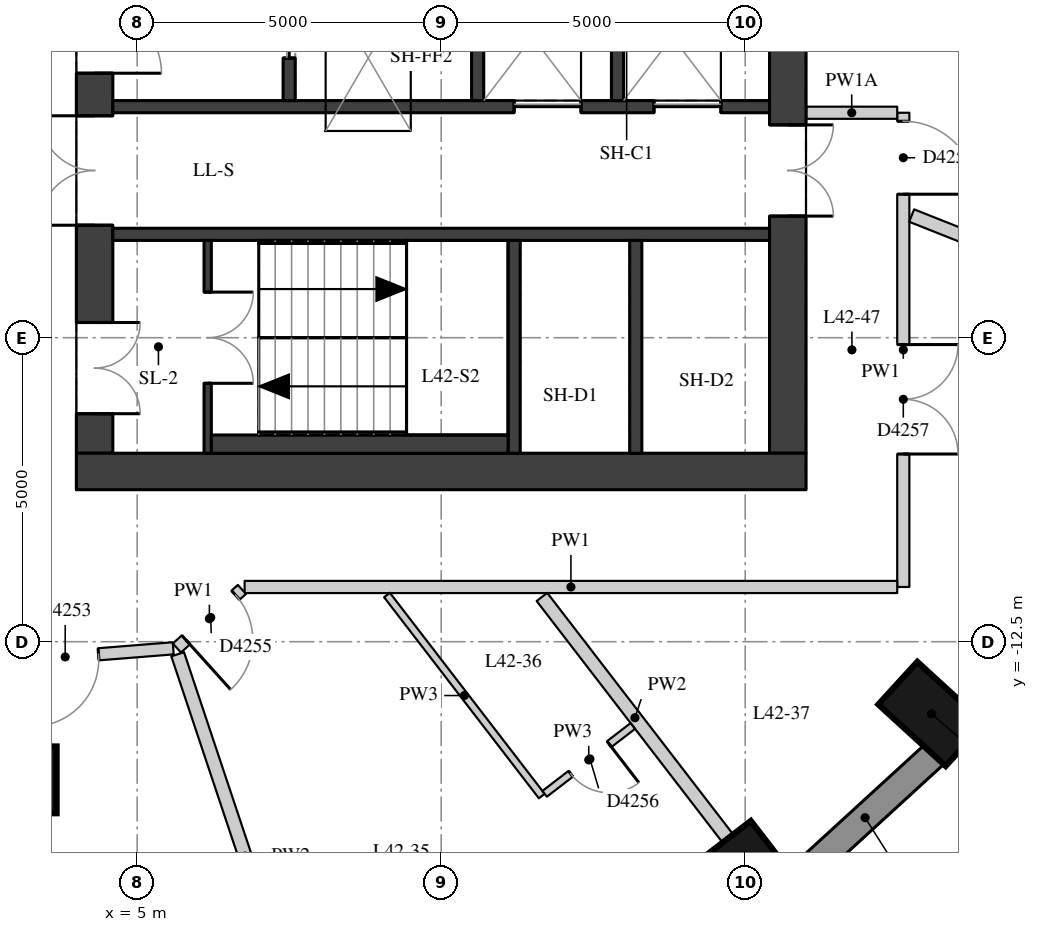
"""IFC4 building model, lengths in metres.
Left out: names, types, materials, properties, quantities, classifications, styles, units other than length and angle.
Written with IfcOpenShell. Run it as: python <this file> out.ifc"""

import sys

from ifc_helpers import new_model, si_unit, direction, frame, frame_2d, origin, origin_2d, place, context, subcontext, project, spatial, rectangle, extrude, element, fill, save


model = new_model("IFC4")
c1 = context("Model", 3, precision=1e-05, world=origin(), true_north=direction((0.0, 1.0)))
c2 = subcontext(c1, "Body", "Model", "MODEL_VIEW")
j1 = project(units=[si_unit("LENGTHUNIT", "METRE"), si_unit("PLANEANGLEUNIT", "RADIAN")], contexts=[c1])
p1 = place(None, origin())
s1 = spatial("IfcSite", under=j1, at=p1, CompositionType="ELEMENT")
p2 = place(p1, origin())
s2 = spatial("IfcBuilding", under=s1, at=p2, CompositionType="ELEMENT")
p3 = place(p2, frame((0.0, 0.0, 151.7)))
s3 = spatial("IfcBuildingStorey", under=s2, at=p3, CompositionType="ELEMENT", Elevation=151.7)
for number, where, z_axis, x_axis in (
    (1, (15.173, -16.332, 0.0), (0.0, 0.0, 1.0), (0.61, -0.792, 0.0)),
    (2, (18.064, -13.688, 0.0), (0.0, 0.0, 1.0), (0.738, -0.675, 0.0)),
):
    element("IfcColumn", number, at=place(p3, frame(where, z_axis=z_axis, x_axis=x_axis)), inside=s3, PredefinedType="COLUMN", context=c2, shape_type="SweptSolid", body=[
        extrude(rectangle(XDim=1.5, YDim=0.95, at=origin_2d()), origin(), (0.0, 0.0, 1.0), 3.3),
    ])
p4 = place(p3, frame((3.126, -14.772, 0.0), z_axis=(0.0, 0.0, 1.0), x_axis=(1.0, 0.0, 0.0)))
e3 = element("IfcColumn", 3, at=p4, inside=s3, PredefinedType="COLUMN", context=c2, shape_type="SweptSolid", body=[
    extrude(rectangle(XDim=1.1, YDim=1.1, at=origin_2d()), origin(), (0.0, 0.0, 1.0), 3.3),
])
p5 = place(p3, frame((15.83, -16.439, 0.0), z_axis=(0.0, 0.0, 1.0), x_axis=(0.737808755941, 0.675009807082, 0.0)))
e4 = element("IfcWall", 4, at=p5, inside=s3, PredefinedType="SOLIDWALL", context=c2, shape_type="SweptSolid", body=[
    extrude(rectangle(XDim=3.094, YDim=0.45, at=frame_2d((1.547, 0.0))), origin(), (0.0, 0.0, 1.0), 3.02),
])
p6 = place(p3, frame((4.3, -9.4, 0.0), z_axis=(0.0, 0.0, 1.0), x_axis=(0.0, 1.0, 0.0)))
e5 = element("IfcWall", 5, at=p6, inside=s3, PredefinedType="SHEAR", context=c2, shape_type="SweptSolid", body=[
    extrude(rectangle(XDim=18.8, YDim=0.6, at=frame_2d((9.4, 0.0))), origin(), (0.0, 0.0, 1.0), 3.02),
])
p7 = place(p6, frame((0.65, 0.0, 0.0)))
e6 = element("IfcOpeningElement", 6, at=p7, cuts=e5, PredefinedType="OPENING", context=c2, shape_type="SweptSolid", body=[
    extrude(rectangle(XDim=1.5, YDim=2.1, at=frame_2d((0.75, 1.05))), frame((0.0, 0.31, 0.0), z_axis=(0.0, -1.0, 0.0), x_axis=(1.0, 0.0, 0.0)), (0.0, 0.0, 1.0), 0.62),
])
p8 = place(p6, frame((3.75, 0.0, 0.0)))
e7 = element("IfcOpeningElement", 7, at=p8, cuts=e5, PredefinedType="OPENING", context=c2, shape_type="SweptSolid", body=[
    extrude(rectangle(XDim=1.8, YDim=2.1, at=frame_2d((0.9, 1.05))), frame((0.0, 0.31, 0.0), z_axis=(0.0, -1.0, 0.0), x_axis=(1.0, 0.0, 0.0)), (0.0, 0.0, 1.0), 0.62),
])
p9 = place(p6, frame((6.25, 0.0, 0.0)))
e8 = element("IfcOpeningElement", 8, at=p9, cuts=e5, PredefinedType="OPENING", context=c2, shape_type="SweptSolid", body=[
    extrude(rectangle(XDim=1.1, YDim=2.1, at=frame_2d((0.55, 1.05))), frame((0.0, 0.31, 0.0), z_axis=(0.0, -1.0, 0.0), x_axis=(1.0, 0.0, 0.0)), (0.0, 0.0, 1.0), 0.62),
])
p10 = place(p6, frame((8.9, 0.0, 0.0)))
e9 = element("IfcOpeningElement", 9, at=p10, cuts=e5, PredefinedType="OPENING", context=c2, shape_type="SweptSolid", body=[
    extrude(rectangle(XDim=1.0, YDim=2.1, at=frame_2d((0.5, 1.05))), frame((0.0, 0.31, 0.0), z_axis=(0.0, -1.0, 0.0), x_axis=(1.0, 0.0, 0.0)), (0.0, 0.0, 1.0), 0.62),
])
p11 = place(p6, frame((11.45, 0.0, 0.0)))
e10 = element("IfcOpeningElement", 10, at=p11, cuts=e5, PredefinedType="OPENING", context=c2, shape_type="SweptSolid", body=[
    extrude(rectangle(XDim=1.1, YDim=2.1, at=frame_2d((0.55, 1.05))), frame((0.0, 0.31, 0.0), z_axis=(0.0, -1.0, 0.0), x_axis=(1.0, 0.0, 0.0)), (0.0, 0.0, 1.0), 0.62),
])
p12 = place(p6, frame((13.25, 0.0, 0.0)))
e11 = element("IfcOpeningElement", 11, at=p12, cuts=e5, PredefinedType="OPENING", context=c2, shape_type="SweptSolid", body=[
    extrude(rectangle(XDim=1.8, YDim=2.1, at=frame_2d((0.9, 1.05))), frame((0.0, 0.31, 0.0), z_axis=(0.0, -1.0, 0.0), x_axis=(1.0, 0.0, 0.0)), (0.0, 0.0, 1.0), 0.62),
])
p13 = place(p6, frame((16.65, 0.0, 0.0)))
e12 = element("IfcOpeningElement", 12, at=p13, cuts=e5, PredefinedType="OPENING", context=c2, shape_type="SweptSolid", body=[
    extrude(rectangle(XDim=1.5, YDim=2.1, at=frame_2d((0.75, 1.05))), frame((0.0, 0.31, 0.0), z_axis=(0.0, -1.0, 0.0), x_axis=(1.0, 0.0, 0.0)), (0.0, 0.0, 1.0), 0.62),
])
p14 = place(p3, frame((15.7, -9.4, 0.0), z_axis=(0.0, 0.0, 1.0), x_axis=(0.0, 1.0, 0.0)))
e13 = element("IfcWall", 13, at=p14, inside=s3, PredefinedType="SHEAR", context=c2, shape_type="SweptSolid", body=[
    extrude(rectangle(XDim=18.8, YDim=0.6, at=frame_2d((9.4, 0.0))), origin(), (0.0, 0.0, 1.0), 3.02),
])
p15 = place(p14, frame((13.4, 0.0, 0.0)))
e14 = element("IfcOpeningElement", 14, at=p15, cuts=e13, PredefinedType="OPENING", context=c2, shape_type="SweptSolid", body=[
    extrude(rectangle(XDim=1.5, YDim=2.1, at=frame_2d((0.75, 1.05))), frame((0.0, 0.31, 0.0), z_axis=(0.0, -1.0, 0.0), x_axis=(1.0, 0.0, 0.0)), (0.0, 0.0, 1.0), 0.62),
])
p16 = place(p14, frame((3.9, 0.0, 0.0)))
e15 = element("IfcOpeningElement", 15, at=p16, cuts=e13, PredefinedType="OPENING", context=c2, shape_type="SweptSolid", body=[
    extrude(rectangle(XDim=1.5, YDim=2.1, at=frame_2d((0.75, 1.05))), frame((0.0, 0.31, 0.0), z_axis=(0.0, -1.0, 0.0), x_axis=(1.0, 0.0, 0.0)), (0.0, 0.0, 1.0), 0.62),
])
p17 = place(p3, frame((4.0, -9.7, 0.0), z_axis=(0.0, 0.0, 1.0), x_axis=(1.0, 0.0, 0.0)))
e16 = element("IfcWall", 16, at=p17, inside=s3, PredefinedType="SHEAR", context=c2, shape_type="SweptSolid", body=[
    extrude(rectangle(XDim=12.0, YDim=0.6, at=frame_2d((6.0, 0.0))), origin(), (0.0, 0.0, 1.0), 3.02),
])
p18 = place(p3, frame((4.6, -3.7, 0.0), z_axis=(0.0, 0.0, 1.0), x_axis=(1.0, 0.0, 0.0)))
e17 = element("IfcWall", 17, at=p18, inside=s3, PredefinedType="SHEAR", context=c2, shape_type="SweptSolid", body=[
    extrude(rectangle(XDim=10.8, YDim=0.2, at=frame_2d((5.4, 0.0))), origin(), (0.0, 0.0, 1.0), 3.02),
])
p19 = place(p18, frame((6.6, 0.0, 0.0)))
e18 = element("IfcOpeningElement", 18, at=p19, cuts=e17, PredefinedType="OPENING", context=c2, shape_type="SweptSolid", body=[
    extrude(rectangle(XDim=1.1, YDim=2.1, at=frame_2d((0.55, 1.05))), frame((0.0, 0.11, 0.0), z_axis=(0.0, -1.0, 0.0), x_axis=(1.0, 0.0, 0.0)), (0.0, 0.0, 1.0), 0.22),
])
p20 = place(p18, frame((8.9, 0.0, 0.0)))
e19 = element("IfcOpeningElement", 19, at=p20, cuts=e17, PredefinedType="OPENING", context=c2, shape_type="SweptSolid", body=[
    extrude(rectangle(XDim=1.1, YDim=2.1, at=frame_2d((0.55, 1.05))), frame((0.0, 0.11, 0.0), z_axis=(0.0, -1.0, 0.0), x_axis=(1.0, 0.0, 0.0)), (0.0, 0.0, 1.0), 0.22),
])
p21 = place(p3, frame((4.6, -5.8, 0.0), z_axis=(0.0, 0.0, 1.0), x_axis=(1.0, 0.0, 0.0)))
e20 = element("IfcWall", 20, at=p21, inside=s3, PredefinedType="SHEAR", context=c2, shape_type="SweptSolid", body=[
    extrude(rectangle(XDim=10.8, YDim=0.2, at=frame_2d((5.4, 0.0))), origin(), (0.0, 0.0, 1.0), 3.02),
])
for number, where, z_axis, x_axis in (
    (21, (11.2, -9.4, 0.0), (0.0, 0.0, 1.0), (0.0, 1.0, 0.0)),
    (22, (13.2, -9.4, 0.0), (0.0, 0.0, 1.0), (0.0, 1.0, 0.0)),
):
    element("IfcWall", number, at=place(p3, frame(where, z_axis=z_axis, x_axis=x_axis)), inside=s3, PredefinedType="SHEAR", context=c2, shape_type="SweptSolid", body=[
        extrude(rectangle(XDim=3.5, YDim=0.2, at=frame_2d((1.75, 0.0))), origin(), (0.0, 0.0, 1.0), 3.02),
    ])
p22 = place(p3, frame((7.5, -3.6, 0.0), z_axis=(0.0, 0.0, 1.0), x_axis=(0.0, 1.0, 0.0)))
e23 = element("IfcWall", 23, at=p22, inside=s3, PredefinedType="SHEAR", context=c2, shape_type="SweptSolid", body=[
    extrude(rectangle(XDim=2.5, YDim=0.2, at=frame_2d((1.25, 0.0))), origin(), (0.0, 0.0, 1.0), 3.02),
])
p23 = place(p22, frame((0.7, 0.0, 0.0)))
e24 = element("IfcOpeningElement", 24, at=p23, cuts=e23, PredefinedType="OPENING", context=c2, shape_type="SweptSolid", body=[
    extrude(rectangle(XDim=1.1, YDim=2.1, at=frame_2d((0.55, 1.05))), frame((0.0, 0.11, 0.0), z_axis=(0.0, -1.0, 0.0), x_axis=(1.0, 0.0, 0.0)), (0.0, 0.0, 1.0), 0.22),
])
for number, where, z_axis, x_axis in (
    (25, (10.6, -3.6, 0.0), (0.0, 0.0, 1.0), (0.0, 1.0, 0.0)),
    (26, (12.9, -3.6, 0.0), (0.0, 0.0, 1.0), (0.0, 1.0, 0.0)),
):
    element("IfcWall", number, at=place(p3, frame(where, z_axis=z_axis, x_axis=x_axis)), inside=s3, PredefinedType="SHEAR", context=c2, shape_type="SweptSolid", body=[
        extrude(rectangle(XDim=2.5, YDim=0.2, at=frame_2d((1.25, 0.0))), origin(), (0.0, 0.0, 1.0), 3.02),
    ])
p24 = place(p3, frame((6.16, -9.4, 0.0), z_axis=(0.0, 0.0, 1.0), x_axis=(0.0, 1.0, 0.0)))
e27 = element("IfcWall", 27, at=p24, inside=s3, PredefinedType="SHEAR", context=c2, shape_type="SweptSolid", body=[
    extrude(rectangle(XDim=3.5, YDim=0.12, at=frame_2d((1.75, 0.0))), origin(), (0.0, 0.0, 1.0), 3.02),
])
p25 = place(p24, frame((1.15, 0.0, 0.0)))
e28 = element("IfcOpeningElement", 28, at=p25, cuts=e27, PredefinedType="OPENING", context=c2, shape_type="SweptSolid", body=[
    extrude(rectangle(XDim=1.5, YDim=2.1, at=frame_2d((0.75, 1.05))), frame((0.0, 0.07, 0.0), z_axis=(0.0, -1.0, 0.0), x_axis=(1.0, 0.0, 0.0)), (0.0, 0.0, 1.0), 0.14),
])
p26 = place(p3, frame((6.22, -9.25, 0.0), z_axis=(0.0, 0.0, 1.0), x_axis=(1.0, 0.0, 0.0)))
e29 = element("IfcWall", 29, at=p26, inside=s3, PredefinedType="PARTITIONING", context=c2, shape_type="SweptSolid", body=[
    extrude(rectangle(XDim=4.88, YDim=0.3, at=frame_2d((2.44, 0.0))), origin(), (0.0, 0.0, 1.0), 3.02),
])
p27 = place(p3, frame((17.6, -3.8, 0.0), z_axis=(0.0, 0.0, 1.0), x_axis=(0.0, -1.0, 0.0)))
e30 = element("IfcWall", 30, at=p27, inside=s3, PredefinedType="PARTITIONING", context=c2, shape_type="SweptSolid", body=[
    extrude(rectangle(XDim=7.8, YDim=0.2, at=frame_2d((3.9, 0.0))), origin(), (0.0, 0.0, 1.0), 3.02),
])
p28 = place(p27, frame((3.813, 0.0, 0.0)))
e31 = element("IfcOpeningElement", 31, at=p28, cuts=e30, PredefinedType="OPENING", context=c2, shape_type="SweptSolid", body=[
    extrude(rectangle(XDim=1.8, YDim=2.1, at=frame_2d((0.9, 1.05))), frame((0.0, 0.11, 0.0), z_axis=(0.0, -1.0, 0.0), x_axis=(1.0, 0.0, 0.0)), (0.0, 0.0, 1.0), 0.22),
])
p29 = place(p27, frame((0.14, 0.0, 0.0)))
e32 = element("IfcOpeningElement", 32, at=p29, cuts=e30, PredefinedType="OPENING", context=c2, shape_type="SweptSolid", body=[
    extrude(rectangle(XDim=1.2, YDim=2.1, at=frame_2d((0.6, 1.05))), frame((0.0, 0.11, 0.0), z_axis=(0.0, -1.0, 0.0), x_axis=(1.0, 0.0, 0.0)), (0.0, 0.0, 1.0), 0.22),
])
p30 = place(p3, frame((17.5, -11.6, 0.0), z_axis=(0.0, 0.0, 1.0), x_axis=(-1.0, 0.0, 0.0)))
e33 = element("IfcWall", 33, at=p30, inside=s3, PredefinedType="PARTITIONING", context=c2, shape_type="SweptSolid", body=[
    extrude(rectangle(XDim=10.732, YDim=0.2, at=frame_2d((5.366, 0.0))), origin(), (0.0, 0.0, 1.0), 3.02),
])
p31 = place(p3, frame((6.723, -11.64, 0.0), z_axis=(0.0, 0.0, 1.0), x_axis=(-0.743032656565, -0.669255161562, 0.0)))
e34 = element("IfcWall", 34, at=p31, inside=s3, PredefinedType="PARTITIONING", context=c2, shape_type="SweptSolid", body=[
    extrude(rectangle(XDim=1.439, YDim=0.2, at=frame_2d((0.72, 0.0))), origin(), (0.0, 0.0, 1.0), 3.02),
])
p32 = place(p31, frame((0.14, 0.0, 0.0)))
e35 = element("IfcOpeningElement", 35, at=p32, cuts=e34, PredefinedType="OPENING", context=c2, shape_type="SweptSolid", body=[
    extrude(rectangle(XDim=1.1, YDim=2.1, at=frame_2d((0.55, 1.05))), frame((0.0, 0.11, 0.0), z_axis=(0.0, -1.0, 0.0), x_axis=(1.0, 0.0, 0.0)), (0.0, 0.0, 1.0), 0.22),
])
p33 = place(p3, frame((5.593, -12.609, 0.0), z_axis=(0.0, 0.0, 1.0), x_axis=(-0.99682930336, -0.079569717626, 0.0)))
e36 = element("IfcWall", 36, at=p33, inside=s3, PredefinedType="PARTITIONING", context=c2, shape_type="SweptSolid", body=[
    extrude(rectangle(XDim=8.349, YDim=0.2, at=frame_2d((4.174, 0.0))), origin(), (0.0, 0.0, 1.0), 3.02),
])
p34 = place(p33, frame((1.232, 0.0, 0.0)))
e37 = element("IfcOpeningElement", 37, at=p34, cuts=e36, PredefinedType="OPENING", context=c2, shape_type="SweptSolid", body=[
    extrude(rectangle(XDim=1.1, YDim=2.1, at=frame_2d((0.55, 1.05))), frame((0.0, 0.11, 0.0), z_axis=(0.0, -1.0, 0.0), x_axis=(1.0, 0.0, 0.0)), (0.0, 0.0, 1.0), 0.22),
])
p35 = place(p3, frame((16.004, -3.8, 0.0), z_axis=(0.0, 0.0, 1.0), x_axis=(1.0, 0.0, 0.0)))
e38 = element("IfcWall", 38, at=p35, inside=s3, PredefinedType="PARTITIONING", context=c2, shape_type="SweptSolid", body=[
    extrude(rectangle(XDim=1.496, YDim=0.2, at=frame_2d((0.748, 0.0))), origin(), (0.0, 0.0, 1.0), 2.57),
])
p36 = place(p3, frame((7.883, -19.345, 0.0), z_axis=(0.0, 0.0, 1.0), x_axis=(-0.31671959997, 0.948519211716, 0.0)))
e39 = element("IfcWall", 39, at=p36, inside=s3, PredefinedType="PARTITIONING", context=c2, shape_type="SweptSolid", body=[
    extrude(rectangle(XDim=6.999, YDim=0.22, at=frame_2d((3.499, 0.0))), origin(), (0.0, 0.0, 1.0), 3.02),
])
p37 = place(p3, frame((14.716, -15.737, 0.0), z_axis=(0.0, 0.0, 1.0), x_axis=(-0.609986007715, 0.792412184657, 0.0)))
e40 = element("IfcWall", 40, at=p37, inside=s3, PredefinedType="PARTITIONING", context=c2, shape_type="SweptSolid", body=[
    extrude(rectangle(XDim=5.015, YDim=0.22, at=frame_2d((2.507, 0.0))), origin(), (0.0, 0.0, 1.0), 3.02),
])
p38 = place(p3, frame((21.439, -6.96, 0.0), z_axis=(0.0, 0.0, 1.0), x_axis=(-0.929517399972, 0.368778257426, 0.0)))
e41 = element("IfcWall", 41, at=p38, inside=s3, PredefinedType="PARTITIONING", context=c2, shape_type="SweptSolid", body=[
    extrude(rectangle(XDim=3.982, YDim=0.22, at=frame_2d((1.991, 0.0))), origin(), (0.0, 0.0, 1.0), 3.02),
])
p39 = place(p3, frame((9.109, -11.732, 0.0), z_axis=(0.0, 0.0, 1.0), x_axis=(0.609996270026, -0.79240428479, 0.0)))
e42 = element("IfcWall", 42, at=p39, inside=s3, PredefinedType="PARTITIONING", context=c2, shape_type="SweptSolid", body=[
    extrude(rectangle(XDim=4.173, YDim=0.12, at=frame_2d((2.087, 0.0))), origin(), (0.0, 0.0, 1.0), 3.02),
])
p40 = place(p3, frame((11.702, -15.002, 0.0), z_axis=(0.0, 0.0, 1.0), x_axis=(0.792395776304, 0.610007322657, 0.0)))
e43 = element("IfcWall", 43, at=p40, inside=s3, PredefinedType="PARTITIONING", context=c2, shape_type="SweptSolid", body=[
    extrude(rectangle(XDim=1.83, YDim=0.12, at=frame_2d((0.915, 0.0))), origin(), (0.0, 0.0, 1.0), 3.02),
])
p41 = place(p40, frame((0.54, 0.0, 0.0)))
e44 = element("IfcOpeningElement", 44, at=p41, cuts=e43, PredefinedType="OPENING", context=c2, shape_type="SweptSolid", body=[
    extrude(rectangle(XDim=0.8, YDim=2.1, at=frame_2d((0.4, 1.05))), frame((0.0, 0.07, 0.0), z_axis=(0.0, -1.0, 0.0), x_axis=(1.0, 0.0, 0.0)), (0.0, 0.0, 1.0), 0.14),
])
p42 = place(p7, origin())
e45 = element("IfcDoor", 45, at=p42, inside=s3, OperationType="DOUBLE_DOOR_SINGLE_SWING", PredefinedType="DOOR", context=c2, shape_type="SweptSolid", body=[
    extrude(rectangle(XDim=1.5, YDim=2.1, at=frame_2d((0.75, 1.05))), frame((0.0, 0.025, 0.0), z_axis=(0.0, -1.0, 0.0), x_axis=(1.0, 0.0, 0.0)), (0.0, 0.0, 1.0), 0.05),
])
fill(e6, e45)
p43 = place(p8, origin())
e46 = element("IfcDoor", 46, at=p43, inside=s3, OperationType="DOUBLE_DOOR_SINGLE_SWING", PredefinedType="DOOR", context=c2, shape_type="SweptSolid", body=[
    extrude(rectangle(XDim=1.8, YDim=2.1, at=frame_2d((0.9, 1.05))), frame((0.0, 0.025, 0.0), z_axis=(0.0, -1.0, 0.0), x_axis=(1.0, 0.0, 0.0)), (0.0, 0.0, 1.0), 0.05),
])
fill(e7, e46)
p44 = place(p9, origin())
e47 = element("IfcDoor", 47, at=p44, inside=s3, OperationType="SINGLE_SWING_RIGHT", PredefinedType="DOOR", context=c2, shape_type="SweptSolid", body=[
    extrude(rectangle(XDim=1.1, YDim=2.1, at=frame_2d((0.55, 1.05))), frame((0.0, 0.025, 0.0), z_axis=(0.0, -1.0, 0.0), x_axis=(1.0, 0.0, 0.0)), (0.0, 0.0, 1.0), 0.05),
])
fill(e8, e47)
p45 = place(p16, origin())
e48 = element("IfcDoor", 48, at=p45, inside=s3, OperationType="DOUBLE_DOOR_SINGLE_SWING", PredefinedType="DOOR", context=c2, shape_type="SweptSolid", body=[
    extrude(rectangle(XDim=1.5, YDim=2.1, at=frame_2d((0.75, 1.05))), frame((0.0, 0.025, 0.0), z_axis=(0.0, -1.0, 0.0), x_axis=(1.0, 0.0, 0.0)), (0.0, 0.0, 1.0), 0.05),
])
fill(e15, e48)
p46 = place(p25, origin())
e49 = element("IfcDoor", 49, at=p46, inside=s3, OperationType="DOUBLE_DOOR_SINGLE_SWING", PredefinedType="DOOR", context=c2, shape_type="SweptSolid", body=[
    extrude(rectangle(XDim=1.5, YDim=2.1, at=frame_2d((0.75, 1.05))), frame((0.0, 0.025, 0.0), z_axis=(0.0, -1.0, 0.0), x_axis=(1.0, 0.0, 0.0)), (0.0, 0.0, 1.0), 0.05),
])
fill(e28, e49)
p47 = place(p19, origin())
e50 = element("IfcDoor", 50, at=p47, inside=s3, OperationType="DOUBLE_DOOR_SLIDING", PredefinedType="DOOR", context=c2, shape_type="SweptSolid", body=[
    extrude(rectangle(XDim=1.1, YDim=2.1, at=frame_2d((0.55, 1.05))), frame((0.0, 0.025, 0.0), z_axis=(0.0, -1.0, 0.0), x_axis=(1.0, 0.0, 0.0)), (0.0, 0.0, 1.0), 0.05),
])
fill(e18, e50)
p48 = place(p20, origin())
e51 = element("IfcDoor", 51, at=p48, inside=s3, OperationType="DOUBLE_DOOR_SLIDING", PredefinedType="DOOR", context=c2, shape_type="SweptSolid", body=[
    extrude(rectangle(XDim=1.1, YDim=2.1, at=frame_2d((0.55, 1.05))), frame((0.0, 0.025, 0.0), z_axis=(0.0, -1.0, 0.0), x_axis=(1.0, 0.0, 0.0)), (0.0, 0.0, 1.0), 0.05),
])
fill(e19, e51)
p49 = place(p23, origin())
e52 = element("IfcDoor", 52, at=p49, inside=s3, OperationType="DOUBLE_DOOR_SLIDING", PredefinedType="DOOR", context=c2, shape_type="SweptSolid", body=[
    extrude(rectangle(XDim=1.1, YDim=2.1, at=frame_2d((0.55, 1.05))), frame((0.0, 0.025, 0.0), z_axis=(0.0, -1.0, 0.0), x_axis=(1.0, 0.0, 0.0)), (0.0, 0.0, 1.0), 0.05),
])
fill(e24, e52)
p50 = place(p34, origin())
e53 = element("IfcDoor", 53, at=p50, inside=s3, OperationType="SINGLE_SWING_RIGHT", PredefinedType="DOOR", context=c2, shape_type="SweptSolid", body=[
    extrude(rectangle(XDim=1.1, YDim=2.1, at=frame_2d((0.55, 1.05))), frame((0.0, 0.025, 0.0), z_axis=(0.0, -1.0, 0.0), x_axis=(1.0, 0.0, 0.0)), (0.0, 0.0, 1.0), 0.05),
])
fill(e37, e53)
p51 = place(p32, origin())
e54 = element("IfcDoor", 54, at=p51, inside=s3, OperationType="SINGLE_SWING_RIGHT", PredefinedType="DOOR", context=c2, shape_type="SweptSolid", body=[
    extrude(rectangle(XDim=1.1, YDim=2.1, at=frame_2d((0.55, 1.05))), frame((0.0, 0.025, 0.0), z_axis=(0.0, -1.0, 0.0), x_axis=(1.0, 0.0, 0.0)), (0.0, 0.0, 1.0), 0.05),
])
fill(e35, e54)
p52 = place(p41, origin())
e55 = element("IfcDoor", 55, at=p52, inside=s3, OperationType="SINGLE_SWING_LEFT", PredefinedType="DOOR", context=c2, shape_type="SweptSolid", body=[
    extrude(rectangle(XDim=0.8, YDim=2.1, at=frame_2d((0.4, 1.05))), frame((0.0, 0.025, 0.0), z_axis=(0.0, -1.0, 0.0), x_axis=(1.0, 0.0, 0.0)), (0.0, 0.0, 1.0), 0.05),
])
fill(e44, e55)
p53 = place(p28, origin())
e56 = element("IfcDoor", 56, at=p53, inside=s3, OperationType="DOUBLE_DOOR_SINGLE_SWING", PredefinedType="DOOR", context=c2, shape_type="SweptSolid", body=[
    extrude(rectangle(XDim=1.8, YDim=2.1, at=frame_2d((0.9, 1.05))), frame((0.0, 0.025, 0.0), z_axis=(0.0, -1.0, 0.0), x_axis=(1.0, 0.0, 0.0)), (0.0, 0.0, 1.0), 0.05),
])
fill(e31, e56)
p54 = place(p29, origin())
e57 = element("IfcDoor", 57, at=p54, inside=s3, OperationType="SINGLE_SWING_RIGHT", PredefinedType="DOOR", context=c2, shape_type="SweptSolid", body=[
    extrude(rectangle(XDim=1.2, YDim=2.1, at=frame_2d((0.6, 1.05))), frame((0.0, 0.025, 0.0), z_axis=(0.0, -1.0, 0.0), x_axis=(1.0, 0.0, 0.0)), (0.0, 0.0, 1.0), 0.05),
])
fill(e32, e57)
save(model, sys.argv[1])
